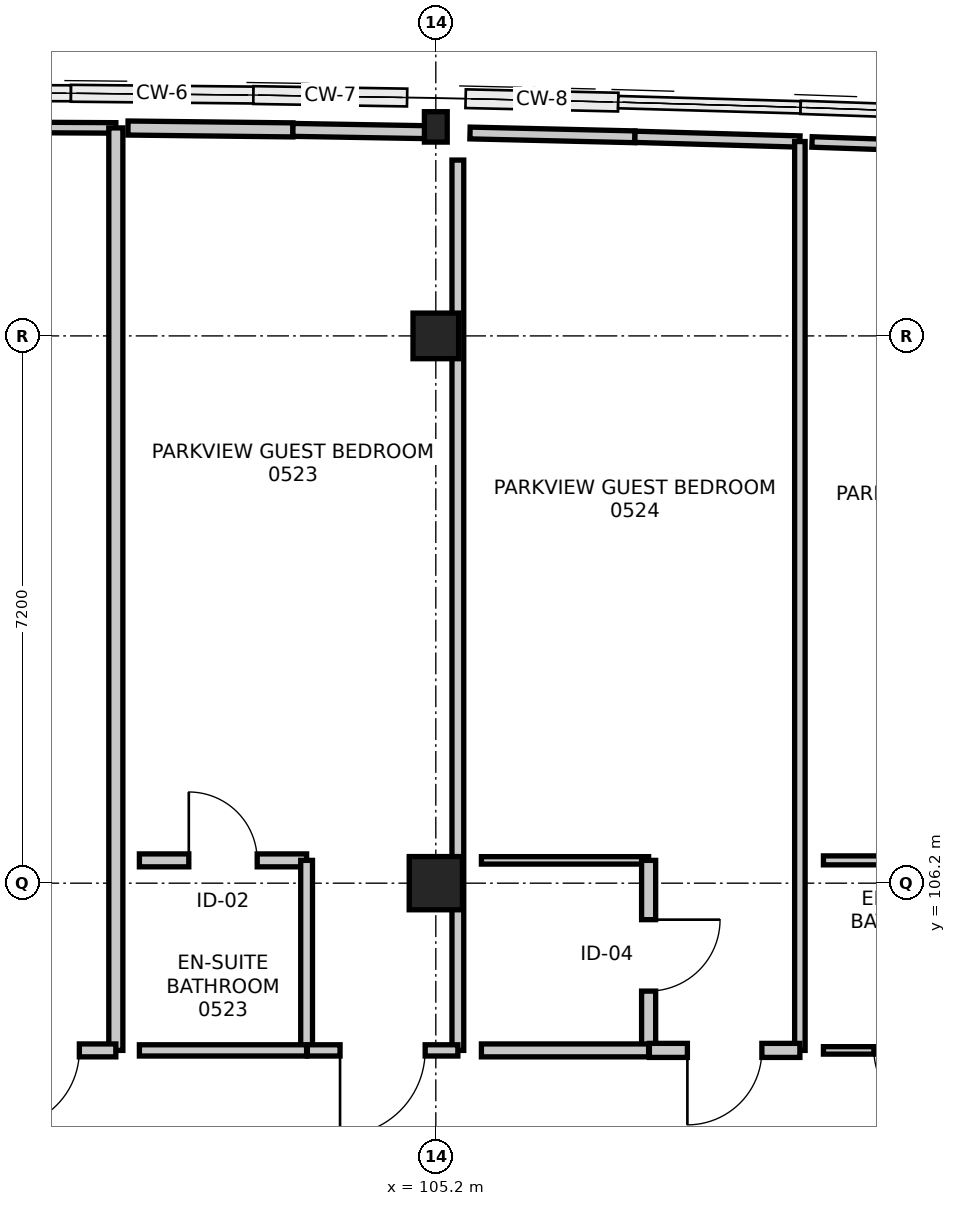
"""IFC4 building model, lengths in metres.
Left out: names, types, materials, properties, quantities, classifications, styles, units other than length and angle.
Written with IfcOpenShell. Run it as: python <this file> out.ifc"""

import sys

from ifc_helpers import new_model, si_unit, direction, frame, frame_2d, origin, origin_2d, place, context, subcontext, project, spatial, rectangle, i_section, extrude, element, fill, save


model = new_model("IFC4")
c1 = context("Model", 3, precision=1e-05, world=origin(), true_north=direction((0.0, 1.0)))
c2 = subcontext(c1, "Body", "Model", "MODEL_VIEW")
j1 = project(units=[si_unit("LENGTHUNIT", "METRE"), si_unit("PLANEANGLEUNIT", "RADIAN")], contexts=[c1])
p1 = place(None, origin())
s1 = spatial("IfcSite", under=j1, at=p1, CompositionType="ELEMENT")
p2 = place(p1, origin())
s2 = spatial("IfcBuilding", under=s1, at=p2, CompositionType="ELEMENT")
p3 = place(p2, frame((0.0, 0.0, 22.8)))
s3 = spatial("IfcBuildingStorey", under=s2, at=p3, CompositionType="ELEMENT", Elevation=22.8)
p4 = place(p3, frame((105.2, 106.2, 0.0), z_axis=(0.0, 0.0, 1.0), x_axis=(1.0, 0.0, 0.0)))
e1 = element("IfcColumn", 1, at=p4, inside=s3, PredefinedType="COLUMN", context=c2, shape_type="SweptSolid", body=[
    extrude(rectangle(XDim=0.7, YDim=0.7, at=origin_2d()), origin(), (0.0, 0.0, 1.0), 3.6),
])
p5 = place(p3, frame((105.2, 113.4, 0.0), z_axis=(0.0, 0.0, 1.0), x_axis=(1.0, 0.0, 0.0)))
e2 = element("IfcColumn", 2, at=p5, inside=s3, PredefinedType="COLUMN", context=c2, shape_type="SweptSolid", body=[
    extrude(rectangle(XDim=0.6, YDim=0.6, at=origin_2d()), origin(), (0.0, 0.0, 1.0), 3.6),
])
p6 = place(p3, frame((105.2, 116.15, 0.0), z_axis=(0.0, 0.0, 1.0), x_axis=(1.0, 0.0, 0.0)))
e3 = element("IfcColumn", 3, at=p6, inside=s3, PredefinedType="COLUMN", context=c2, shape_type="SweptSolid", body=[
    extrude(i_section(OverallWidth=0.3, OverallDepth=0.4, WebThickness=0.013, FlangeThickness=0.024, FilletRadius=0.027, at=origin_2d()), origin(), (0.0, 0.0, 1.0), 3.6),
])
p7 = place(p3, frame((98.82, 116.147, 0.0), z_axis=(0.0, 0.0, 1.0), x_axis=(0.999987746525, -0.004950434389, 0.0)))
e4 = element("IfcWall", 4, at=p7, inside=s3, PredefinedType="PARTITIONING", context=c2, shape_type="SweptSolid", body=[
    extrude(rectangle(XDim=2.17, YDim=0.138, at=frame_2d((1.085, 0.0))), origin(), (0.0, 0.0, 1.0), 2.926),
])
p8 = place(p3, frame((100.99, 116.136, 0.0), z_axis=(0.0, 0.0, 1.0), x_axis=(0.0, -1.0, 0.0)))
e5 = element("IfcWall", 5, at=p8, inside=s3, PredefinedType="PARTITIONING", context=c2, shape_type="SweptSolid", body=[
    extrude(rectangle(XDim=12.136, YDim=0.185, at=frame_2d((6.068, 0.0))), origin(), (0.0, 0.0, 1.0), 2.735),
])
p9 = place(p3, frame((100.99, 104.0, 0.0), z_axis=(0.0, 0.0, 1.0), x_axis=(-1.0, 0.0, 0.0)))
e6 = element("IfcWall", 6, at=p9, inside=s3, PredefinedType="PARTITIONING", context=c2, shape_type="SweptSolid", body=[
    extrude(rectangle(XDim=1.98, YDim=0.17, at=frame_2d((0.99, 0.0))), origin(), (0.0, 0.0, 1.0), 3.35),
])
p10 = place(p9, frame((0.48, 0.0, 0.0)))
e7 = element("IfcOpeningElement", 7, at=p10, cuts=e6, PredefinedType="OPENING", context=c2, shape_type="SweptSolid", body=[
    extrude(rectangle(XDim=1.02, YDim=2.15, at=frame_2d((0.51, 1.075))), frame((0.0, 0.095, 0.0), z_axis=(0.0, -1.0, 0.0), x_axis=(1.0, 0.0, 0.0)), (0.0, 0.0, 1.0), 0.19),
])
p11 = place(p3, frame((101.3, 106.5, 0.0), z_axis=(0.0, 0.0, 1.0), x_axis=(1.0, 0.0, 0.0)))
e8 = element("IfcWall", 8, at=p11, inside=s3, PredefinedType="PARTITIONING", context=c2, shape_type="SweptSolid", body=[
    extrude(rectangle(XDim=2.2, YDim=0.17, at=frame_2d((1.1, 0.0))), origin(), (0.0, 0.0, 1.0), 2.735),
])
p12 = place(p11, frame((0.65, 0.0, 0.0)))
e9 = element("IfcOpeningElement", 9, at=p12, cuts=e8, PredefinedType="OPENING", context=c2, shape_type="SweptSolid", body=[
    extrude(rectangle(XDim=0.9, YDim=2.08, at=frame_2d((0.45, 1.04))), frame((0.0, 0.095, 0.0), z_axis=(0.0, -1.0, 0.0), x_axis=(1.0, 0.0, 0.0)), (0.0, 0.0, 1.0), 0.19),
])
p13 = place(p3, frame((103.5, 106.5, 0.0), z_axis=(0.0, 0.0, 1.0), x_axis=(0.0, -1.0, 0.0)))
e10 = element("IfcWall", 10, at=p13, inside=s3, PredefinedType="PARTITIONING", context=c2, shape_type="SweptSolid", body=[
    extrude(rectangle(XDim=2.5, YDim=0.155, at=frame_2d((1.25, 0.0))), origin(), (0.0, 0.0, 1.0), 2.735),
])
p14 = place(p3, frame((103.5, 104.0, 0.0), z_axis=(0.0, 0.0, 1.0), x_axis=(-1.0, 0.0, 0.0)))
e11 = element("IfcWall", 11, at=p14, inside=s3, PredefinedType="PARTITIONING", context=c2, shape_type="SweptSolid", body=[
    extrude(rectangle(XDim=2.2, YDim=0.148, at=frame_2d((1.1, 0.0))), origin(), (0.0, 0.0, 1.0), 3.35),
])
p15 = place(p3, frame((101.15, 116.135, 0.0), z_axis=(0.0, 0.0, 1.0), x_axis=(0.999936726338, -0.011249147557, 0.0)))
e12 = element("IfcWall", 12, at=p15, inside=s3, PredefinedType="PARTITIONING", context=c2, shape_type="SweptSolid", body=[
    extrude(rectangle(XDim=2.17, YDim=0.185, at=frame_2d((1.085, 0.0))), origin(), (0.0, 0.0, 1.0), 2.926),
])
p16 = place(p3, frame((103.32, 116.11, 0.0), z_axis=(0.0, 0.0, 1.0), x_axis=(0.999853318035, -0.017127241892, 0.0)))
e13 = element("IfcWall", 13, at=p16, inside=s3, PredefinedType="PARTITIONING", context=c2, shape_type="SweptSolid", body=[
    extrude(rectangle(XDim=1.81, YDim=0.17, at=frame_2d((0.905, 0.0))), origin(), (0.0, 0.0, 1.0), 2.926),
])
p17 = place(p3, frame((105.49, 115.713, 0.0), z_axis=(0.0, 0.0, 1.0), x_axis=(0.0, -1.0, 0.0)))
e14 = element("IfcWall", 14, at=p17, inside=s3, PredefinedType="PARTITIONING", context=c2, shape_type="SweptSolid", body=[
    extrude(rectangle(XDim=11.713, YDim=0.155, at=frame_2d((5.856, 0.0))), origin(), (0.0, 0.0, 1.0), 2.685),
])
p18 = place(p3, frame((105.49, 104.0, 0.0), z_axis=(0.0, 0.0, 1.0), x_axis=(-1.0, 0.0, 0.0)))
e15 = element("IfcWall", 15, at=p18, inside=s3, PredefinedType="PARTITIONING", context=c2, shape_type="SweptSolid", body=[
    extrude(rectangle(XDim=1.98, YDim=0.148, at=frame_2d((0.99, 0.0))), origin(), (0.0, 0.0, 1.0), 2.685),
])
p19 = place(p18, frame((0.43, 0.0, 0.0)))
e16 = element("IfcOpeningElement", 16, at=p19, cuts=e15, PredefinedType="OPENING", context=c2, shape_type="SweptSolid", body=[
    extrude(rectangle(XDim=1.12, YDim=2.2, at=frame_2d((0.56, 1.1))), frame((0.0, 0.084, 0.0), z_axis=(0.0, -1.0, 0.0), x_axis=(1.0, 0.0, 0.0)), (0.0, 0.0, 1.0), 0.168),
])
p20 = place(p3, frame((105.8, 106.5, 0.0), z_axis=(0.0, 0.0, 1.0), x_axis=(1.0, 0.0, 0.0)))
e17 = element("IfcWall", 17, at=p20, inside=s3, PredefinedType="PARTITIONING", context=c2, shape_type="SweptSolid", body=[
    extrude(rectangle(XDim=2.2, YDim=0.098, at=frame_2d((1.1, 0.0))), origin(), (0.0, 0.0, 1.0), 3.35),
])
p21 = place(p3, frame((108.0, 106.5, 0.0), z_axis=(0.0, 0.0, 1.0), x_axis=(0.0, -1.0, 0.0)))
e18 = element("IfcWall", 18, at=p21, inside=s3, PredefinedType="PARTITIONING", context=c2, shape_type="SweptSolid", body=[
    extrude(rectangle(XDim=2.5, YDim=0.185, at=frame_2d((1.25, 0.0))), origin(), (0.0, 0.0, 1.0), 2.735),
])
p22 = place(p21, frame((0.78, 0.0, 0.0)))
e19 = element("IfcOpeningElement", 19, at=p22, cuts=e18, PredefinedType="OPENING", context=c2, shape_type="SweptSolid", body=[
    extrude(rectangle(XDim=0.94, YDim=2.12, at=frame_2d((0.47, 1.06))), frame((0.0, 0.103, 0.0), z_axis=(0.0, -1.0, 0.0), x_axis=(1.0, 0.0, 0.0)), (0.0, 0.0, 1.0), 0.205),
])
p23 = place(p3, frame((108.0, 104.0, 0.0), z_axis=(0.0, 0.0, 1.0), x_axis=(-1.0, 0.0, 0.0)))
e20 = element("IfcWall", 20, at=p23, inside=s3, PredefinedType="PARTITIONING", context=c2, shape_type="SweptSolid", body=[
    extrude(rectangle(XDim=2.2, YDim=0.17, at=frame_2d((1.1, 0.0))), origin(), (0.0, 0.0, 1.0), 3.35),
])
p24 = place(p3, frame((105.65, 116.07, 0.0), z_axis=(0.0, 0.0, 1.0), x_axis=(0.999731574518, -0.023168489633, 0.0)))
e21 = element("IfcWall", 21, at=p24, inside=s3, PredefinedType="PARTITIONING", context=c2, shape_type="SweptSolid", body=[
    extrude(rectangle(XDim=2.171, YDim=0.155, at=frame_2d((1.085, 0.0))), origin(), (0.0, 0.0, 1.0), 2.926),
])
p25 = place(p3, frame((107.82, 116.019, 0.0), z_axis=(0.0, 0.0, 1.0), x_axis=(0.999591902973, -0.028566195247, 0.0)))
e22 = element("IfcWall", 22, at=p25, inside=s3, PredefinedType="PARTITIONING", context=c2, shape_type="SweptSolid", body=[
    extrude(rectangle(XDim=2.171, YDim=0.148, at=frame_2d((1.085, 0.0))), origin(), (0.0, 0.0, 1.0), 2.926),
])
p26 = place(p3, frame((109.99, 115.957, 0.0), z_axis=(0.0, 0.0, 1.0), x_axis=(0.0, -1.0, 0.0)))
e23 = element("IfcWall", 23, at=p26, inside=s3, PredefinedType="PARTITIONING", context=c2, shape_type="SweptSolid", body=[
    extrude(rectangle(XDim=11.957, YDim=0.138, at=frame_2d((5.979, 0.0))), origin(), (0.0, 0.0, 1.0), 2.735),
])
p27 = place(p3, frame((109.99, 104.0, 0.0), z_axis=(0.0, 0.0, 1.0), x_axis=(-1.0, 0.0, 0.0)))
e24 = element("IfcWall", 24, at=p27, inside=s3, PredefinedType="PARTITIONING", context=c2, shape_type="SweptSolid", body=[
    extrude(rectangle(XDim=1.98, YDim=0.185, at=frame_2d((0.99, 0.0))), origin(), (0.0, 0.0, 1.0), 3.35),
])
p28 = place(p27, frame((0.5, 0.0, 0.0)))
e25 = element("IfcOpeningElement", 25, at=p28, cuts=e24, PredefinedType="OPENING", context=c2, shape_type="SweptSolid", body=[
    extrude(rectangle(XDim=0.98, YDim=2.15, at=frame_2d((0.49, 1.075))), frame((0.0, 0.103, 0.0), z_axis=(0.0, -1.0, 0.0), x_axis=(1.0, 0.0, 0.0)), (0.0, 0.0, 1.0), 0.205),
])
p29 = place(p3, frame((110.3, 106.5, 0.0), z_axis=(0.0, 0.0, 1.0), x_axis=(1.0, 0.0, 0.0)))
e26 = element("IfcWall", 26, at=p29, inside=s3, PredefinedType="PARTITIONING", context=c2, shape_type="SweptSolid", body=[
    extrude(rectangle(XDim=1.79, YDim=0.118, at=frame_2d((0.895, 0.0))), origin(), (0.0, 0.0, 1.0), 3.35),
])
p30 = place(p3, frame((112.5, 104.0, 0.0), z_axis=(0.0, 0.0, 1.0), x_axis=(-1.0, 0.0, 0.0)))
e27 = element("IfcWall", 27, at=p30, inside=s3, PredefinedType="PARTITIONING", context=c2, shape_type="SweptSolid", body=[
    extrude(rectangle(XDim=2.2, YDim=0.098, at=frame_2d((1.1, 0.0))), origin(), (0.0, 0.0, 1.0), 2.685),
])
p31 = place(p30, frame((0.665, 0.0, 0.0)))
e28 = element("IfcOpeningElement", 28, at=p31, cuts=e27, PredefinedType="OPENING", context=c2, shape_type="SweptSolid", body=[
    extrude(rectangle(XDim=0.87, YDim=2.07, at=frame_2d((0.435, 1.035))), frame((0.0, 0.059, 0.0), z_axis=(0.0, -1.0, 0.0), x_axis=(1.0, 0.0, 0.0)), (0.0, 0.0, 1.0), 0.118),
])
p32 = place(p3, frame((110.15, 115.952, 0.0), z_axis=(0.0, 0.0, 1.0), x_axis=(0.999404557823, -0.034504054862, 0.0)))
e29 = element("IfcWall", 29, at=p32, inside=s3, PredefinedType="PARTITIONING", context=c2, shape_type="SweptSolid", body=[
    extrude(rectangle(XDim=1.811, YDim=0.138, at=frame_2d((0.906, 0.0))), origin(), (0.0, 0.0, 1.0), 2.926),
])
p33 = place(p10, origin())
e30 = element("IfcDoor", 30, at=p33, inside=s3, OperationType="SINGLE_SWING_RIGHT", PredefinedType="DOOR", context=c2, shape_type="SweptSolid", body=[
    extrude(rectangle(XDim=1.02, YDim=2.15, at=frame_2d((0.51, 1.075))), frame((0.0, 0.025, 0.0), z_axis=(0.0, -1.0, 0.0), x_axis=(1.0, 0.0, 0.0)), (0.0, 0.0, 1.0), 0.05),
])
fill(e7, e30)
p34 = place(p12, origin())
e31 = element("IfcDoor", 31, at=p34, inside=s3, OperationType="SINGLE_SWING_LEFT", PredefinedType="DOOR", context=c2, shape_type="SweptSolid", body=[
    extrude(rectangle(XDim=0.9, YDim=2.08, at=frame_2d((0.45, 1.04))), frame((0.0, 0.025, 0.0), z_axis=(0.0, -1.0, 0.0), x_axis=(1.0, 0.0, 0.0)), (0.0, 0.0, 1.0), 0.05),
])
fill(e9, e31)
p35 = place(p19, origin())
e32 = element("IfcDoor", 32, at=p35, inside=s3, OperationType="SINGLE_SWING_RIGHT", PredefinedType="DOOR", context=c2, shape_type="SweptSolid", body=[
    extrude(rectangle(XDim=1.12, YDim=2.2, at=frame_2d((0.56, 1.1))), frame((0.0, 0.025, 0.0), z_axis=(0.0, -1.0, 0.0), x_axis=(1.0, 0.0, 0.0)), (0.0, 0.0, 1.0), 0.05),
])
fill(e16, e32)
p36 = place(p22, origin())
e33 = element("IfcDoor", 33, at=p36, inside=s3, OperationType="SINGLE_SWING_LEFT", PredefinedType="DOOR", context=c2, shape_type="SweptSolid", body=[
    extrude(rectangle(XDim=0.94, YDim=2.12, at=frame_2d((0.47, 1.06))), frame((0.0, 0.025, 0.0), z_axis=(0.0, -1.0, 0.0), x_axis=(1.0, 0.0, 0.0)), (0.0, 0.0, 1.0), 0.05),
])
fill(e19, e33)
p37 = place(p28, origin())
e34 = element("IfcDoor", 34, at=p37, inside=s3, OperationType="SINGLE_SWING_RIGHT", PredefinedType="DOOR", context=c2, shape_type="SweptSolid", body=[
    extrude(rectangle(XDim=0.98, YDim=2.15, at=frame_2d((0.49, 1.075))), frame((0.0, 0.025, 0.0), z_axis=(0.0, -1.0, 0.0), x_axis=(1.0, 0.0, 0.0)), (0.0, 0.0, 1.0), 0.05),
])
fill(e25, e34)
p38 = place(p31, origin())
e35 = element("IfcDoor", 35, at=p38, inside=s3, OperationType="SINGLE_SWING_LEFT", PredefinedType="DOOR", context=c2, shape_type="SweptSolid", body=[
    extrude(rectangle(XDim=0.87, YDim=2.07, at=frame_2d((0.435, 1.035))), frame((0.0, 0.025, 0.0), z_axis=(0.0, -1.0, 0.0), x_axis=(1.0, 0.0, 0.0)), (0.0, 0.0, 1.0), 0.05),
])
fill(e28, e35)
save(model, sys.argv[1])
